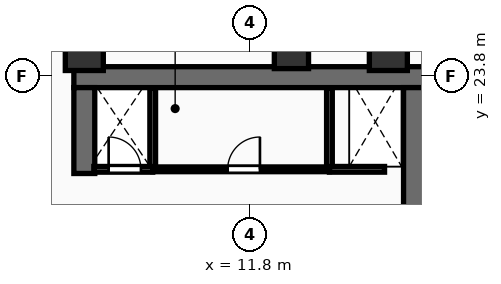
"""IFC4 building model, lengths in metres.
Left out: names, types, materials, properties, quantities, classifications, styles, units other than length and angle.
Written with IfcOpenShell. Run it as: python <this file> out.ifc"""

import sys

from ifc_helpers import new_model, si_unit, direction, frame, frame_2d, origin, origin_2d, place, context, subcontext, project, spatial, rectangle, extrude, element, fill, save


model = new_model("IFC4")
c1 = context("Model", 3, precision=1e-05, world=origin(), true_north=direction((0.0, 1.0)))
c2 = subcontext(c1, "Body", "Model", "MODEL_VIEW")
j1 = project(units=[si_unit("LENGTHUNIT", "METRE"), si_unit("PLANEANGLEUNIT", "RADIAN")], contexts=[c1])
p1 = place(None, origin())
s1 = spatial("IfcSite", under=j1, at=p1, CompositionType="ELEMENT")
p2 = place(p1, origin())
s2 = spatial("IfcBuilding", under=s1, at=p2, CompositionType="ELEMENT")
p3 = place(p2, frame((0.0, 0.0, 234.9)))
s3 = spatial("IfcBuildingStorey", under=s2, at=p3, CompositionType="ELEMENT", Elevation=234.9)
p4 = place(p3, frame((7.175, 23.775, 0.0), z_axis=(0.0, 0.0, 1.0), x_axis=(1.0, 0.0, 0.0)))
e1 = element("IfcWall", 1, at=p4, inside=s3, PredefinedType="SHEAR", context=c2, shape_type="SweptSolid", body=[
    extrude(rectangle(XDim=13.9, YDim=0.55, at=frame_2d((6.95, 0.0))), origin(), (0.0, 0.0, 1.0), 3.56),
])
p5 = place(p3, frame((7.45, 21.24, 0.0), z_axis=(0.0, 0.0, 1.0), x_axis=(0.0, 1.0, 0.0)))
e2 = element("IfcWall", 2, at=p5, inside=s3, PredefinedType="SHEAR", context=c2, shape_type="SweptSolid", body=[
    extrude(rectangle(XDim=2.26, YDim=0.55, at=frame_2d((1.13, 0.0))), origin(), (0.0, 0.0, 1.0), 3.56),
])
p6 = place(p3, frame((16.125, 14.4, 0.0), z_axis=(0.0, 0.0, 1.0), x_axis=(0.0, 1.0, 0.0)))
e3 = element("IfcWall", 3, at=p6, inside=s3, PredefinedType="SHEAR", context=c2, shape_type="SweptSolid", body=[
    extrude(rectangle(XDim=9.1, YDim=0.55, at=frame_2d((4.55, 0.0))), origin(), (0.0, 0.0, 1.0), 3.56),
])
for number, where, z_axis, x_axis in (
    (4, (7.45, 24.45, 0.0), (0.0, 0.0, 1.0), (1.0, 0.0, 0.0)),
    (5, (15.45, 24.45, 0.0), (0.0, 0.0, 1.0), (1.0, 0.0, 0.0)),
):
    element("IfcColumn", number, at=place(p3, frame(where, z_axis=z_axis, x_axis=x_axis)), inside=s3, PredefinedType="COLUMN", context=c2, shape_type="SweptSolid", body=[
        extrude(rectangle(XDim=1.0, YDim=1.0, at=origin_2d()), origin(), (0.0, 0.0, 1.0), 3.56),
    ])
p7 = place(p3, frame((12.9, 24.45, 0.0), z_axis=(0.0, 0.0, 1.0), x_axis=(1.0, 0.0, 0.0)))
e6 = element("IfcColumn", 6, at=p7, inside=s3, PredefinedType="COLUMN", context=c2, shape_type="SweptSolid", body=[
    extrude(rectangle(XDim=0.9, YDim=0.9, at=origin_2d()), origin(), (0.0, 0.0, 1.0), 3.56),
])
for number, where, z_axis, x_axis in (
    (7, (9.25, 21.35, 0.0), (0.0, 0.0, 1.0), (0.0, 1.0, 0.0)),
    (8, (13.9, 21.35, 0.0), (0.0, 0.0, 1.0), (0.0, 1.0, 0.0)),
):
    element("IfcWall", number, at=place(p3, frame(where, z_axis=z_axis, x_axis=x_axis)), inside=s3, PredefinedType="PARTITIONING", context=c2, shape_type="SweptSolid", body=[
        extrude(rectangle(XDim=2.13, YDim=0.15, at=frame_2d((1.065, 0.0))), origin(), (0.0, 0.0, 1.0), 3.56),
    ])
p8 = place(p3, frame((7.7, 21.35, 0.0), z_axis=(0.0, 0.0, 1.0), x_axis=(1.0, 0.0, 0.0)))
e9 = element("IfcWall", 9, at=p8, inside=s3, PredefinedType="PARTITIONING", context=c2, shape_type="SweptSolid", body=[
    extrude(rectangle(XDim=1.55, YDim=0.15, at=frame_2d((0.775, 0.0))), origin(), (0.0, 0.0, 1.0), 3.56),
])
p9 = place(p8, frame((0.39, 0.0, 0.0)))
e10 = element("IfcOpeningElement", 10, at=p9, cuts=e9, PredefinedType="OPENING", context=c2, shape_type="SweptSolid", body=[
    extrude(rectangle(XDim=0.85, YDim=2.15, at=frame_2d((0.425, 1.075))), frame((0.0, 0.085, 0.0), z_axis=(0.0, -1.0, 0.0), x_axis=(1.0, 0.0, 0.0)), (0.0, 0.0, 1.0), 0.17),
])
p10 = place(p3, frame((13.9, 21.35, 0.0), z_axis=(0.0, 0.0, 1.0), x_axis=(1.0, 0.0, 0.0)))
e11 = element("IfcWall", 11, at=p10, inside=s3, PredefinedType="PARTITIONING", context=c2, shape_type="SweptSolid", body=[
    extrude(rectangle(XDim=1.45, YDim=0.15, at=frame_2d((0.725, 0.0))), origin(), (0.0, 0.0, 1.0), 3.56),
])
p11 = place(p3, frame((9.25, 21.35, 0.0), z_axis=(0.0, 0.0, 1.0), x_axis=(1.0, 0.0, 0.0)))
e12 = element("IfcWall", 12, at=p11, inside=s3, PredefinedType="PARTITIONING", context=c2, shape_type="SweptSolid", body=[
    extrude(rectangle(XDim=4.65, YDim=0.125, at=frame_2d((2.325, 0.0))), origin(), (0.0, 0.0, 1.0), 3.56),
])
p12 = place(p11, frame((1.971, 0.0, 0.0)))
e13 = element("IfcOpeningElement", 13, at=p12, cuts=e12, PredefinedType="OPENING", context=c2, shape_type="SweptSolid", body=[
    extrude(rectangle(XDim=0.85, YDim=2.15, at=frame_2d((0.425, 1.075))), frame((0.0, 0.073, 0.0), z_axis=(0.0, -1.0, 0.0), x_axis=(1.0, 0.0, 0.0)), (0.0, 0.0, 1.0), 0.145),
])
p13 = place(p9, origin())
e14 = element("IfcDoor", 14, at=p13, inside=s3, OperationType="SINGLE_SWING_LEFT", PredefinedType="DOOR", context=c2, shape_type="SweptSolid", body=[
    extrude(rectangle(XDim=0.85, YDim=2.15, at=frame_2d((0.425, 1.075))), frame((0.0, 0.025, 0.0), z_axis=(0.0, -1.0, 0.0), x_axis=(1.0, 0.0, 0.0)), (0.0, 0.0, 1.0), 0.05),
])
fill(e10, e14)
p14 = place(p12, origin())
e15 = element("IfcDoor", 15, at=p14, inside=s3, OperationType="SINGLE_SWING_RIGHT", PredefinedType="DOOR", context=c2, shape_type="SweptSolid", body=[
    extrude(rectangle(XDim=0.85, YDim=2.15, at=frame_2d((0.425, 1.075))), frame((0.0, 0.025, 0.0), z_axis=(0.0, -1.0, 0.0), x_axis=(1.0, 0.0, 0.0)), (0.0, 0.0, 1.0), 0.05),
])
fill(e13, e15)
save(model, sys.argv[1])
